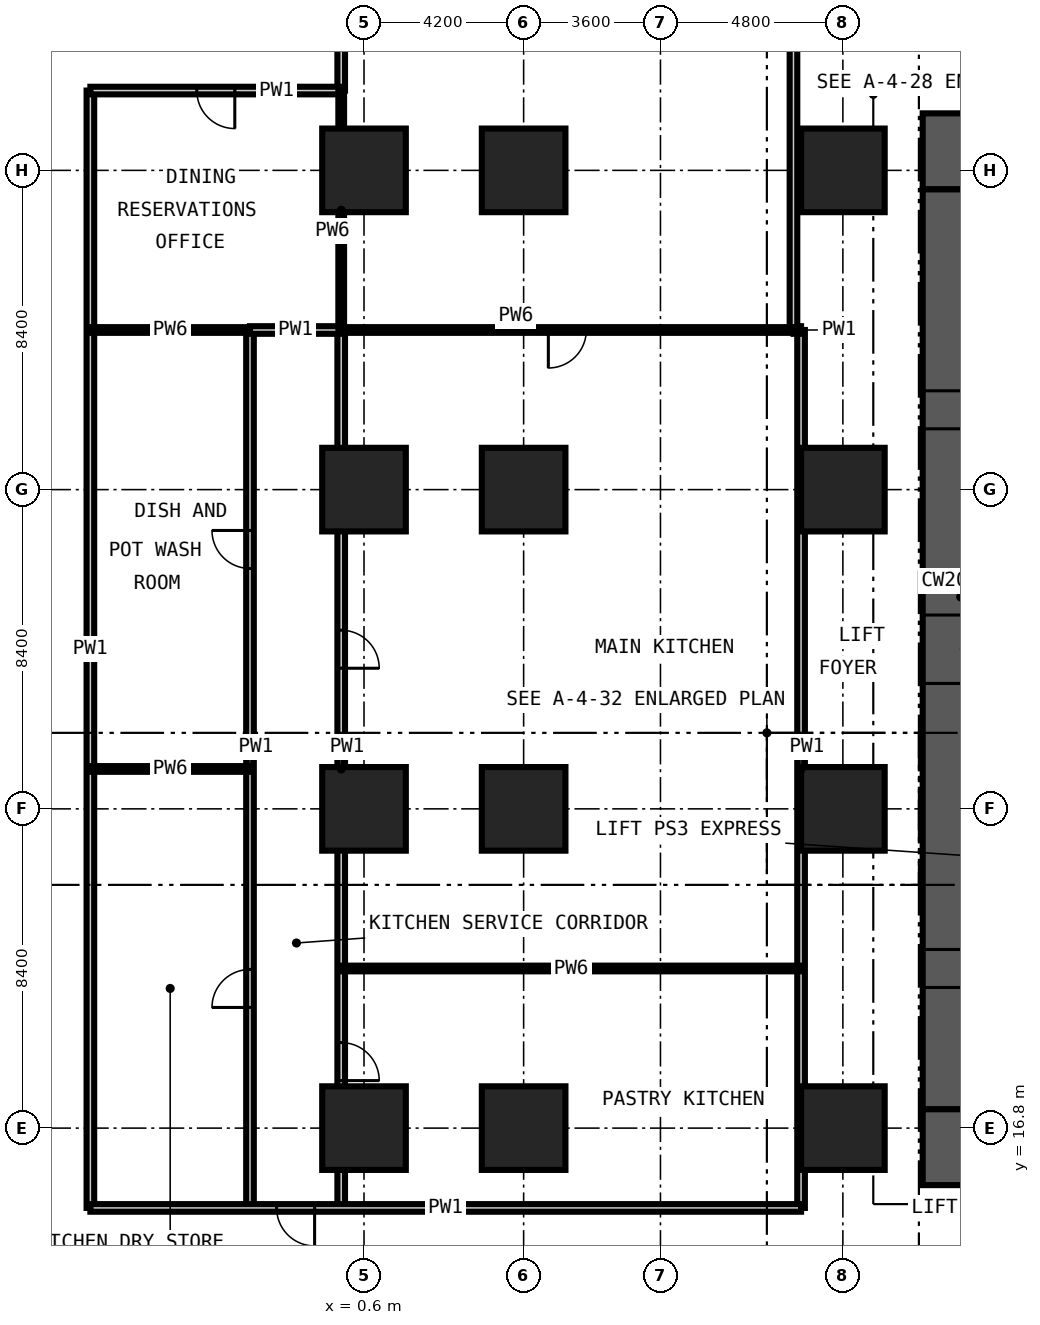
"""IFC4 building model, lengths in metres.
Left out: names, types, materials, properties, quantities, classifications, styles, units other than length and angle.
Written with IfcOpenShell. Run it as: python <this file> out.ifc"""

import sys

from ifc_helpers import new_model, si_unit, direction, frame, frame_2d, origin, origin_2d, place, context, subcontext, project, spatial, rectangle, extrude, element, fill, save


model = new_model("IFC4")
c1 = context("Model", 3, precision=1e-05, world=origin(), true_north=direction((0.0, 1.0)))
c2 = subcontext(c1, "Body", "Model", "MODEL_VIEW")
j1 = project(units=[si_unit("LENGTHUNIT", "METRE"), si_unit("PLANEANGLEUNIT", "RADIAN")], contexts=[c1])
p1 = place(None, origin())
s1 = spatial("IfcSite", under=j1, at=p1, CompositionType="ELEMENT")
p2 = place(p1, origin())
s2 = spatial("IfcBuilding", under=s1, at=p2, CompositionType="ELEMENT")
p3 = place(p2, frame((0.0, 0.0, 17.0)))
s3 = spatial("IfcBuildingStorey", under=s2, at=p3, CompositionType="ELEMENT", Elevation=17.0)
for number, where, z_axis, x_axis in (
    (1, (0.6, 16.8, -0.3), (0.0, 0.0, 1.0), (1.0, 0.0, 0.0)),
    (2, (0.6, 25.2, -0.3), (0.0, 0.0, 1.0), (1.0, 0.0, 0.0)),
    (3, (0.6, 33.6, -0.3), (0.0, 0.0, 1.0), (1.0, 0.0, 0.0)),
    (4, (0.6, 42.0, -0.3), (0.0, 0.0, 1.0), (1.0, 0.0, 0.0)),
    (5, (4.8, 16.8, -0.3), (0.0, 0.0, 1.0), (1.0, 0.0, 0.0)),
    (6, (4.8, 25.2, -0.3), (0.0, 0.0, 1.0), (1.0, 0.0, 0.0)),
    (7, (4.8, 33.6, -0.3), (0.0, 0.0, 1.0), (1.0, 0.0, 0.0)),
    (8, (4.8, 42.0, -0.3), (0.0, 0.0, 1.0), (1.0, 0.0, 0.0)),
    (9, (13.2, 16.8, -0.3), (0.0, 0.0, 1.0), (1.0, 0.0, 0.0)),
    (10, (13.2, 25.2, -0.3), (0.0, 0.0, 1.0), (1.0, 0.0, 0.0)),
    (11, (13.2, 33.6, -0.3), (0.0, 0.0, 1.0), (1.0, 0.0, 0.0)),
    (12, (13.2, 42.0, -0.3), (0.0, 0.0, 1.0), (1.0, 0.0, 0.0)),
):
    element("IfcColumn", number, at=place(p3, frame(where, z_axis=z_axis, x_axis=x_axis)), inside=s3, PredefinedType="COLUMN", context=c2, shape_type="SweptSolid", body=[
        extrude(rectangle(XDim=2.2, YDim=2.2, at=origin_2d()), origin(), (0.0, 0.0, 1.0), 4.95),
    ])
p4 = place(p3, frame((15.3, 16.3, -0.3), z_axis=(0.0, 0.0, 1.0), x_axis=(1.0, 0.0, 0.0)))
e13 = element("IfcWall", 13, at=p4, inside=s3, PredefinedType="SHEAR", context=c2, shape_type="SweptSolid", body=[
    extrude(rectangle(XDim=28.2, YDim=2.0, at=frame_2d((14.1, 0.0))), origin(), (0.0, 0.0, 1.0), 4.95),
])
p5 = place(p4, frame((13.6, 0.0, 0.3)))
e14 = element("IfcOpeningElement", 14, at=p5, cuts=e13, PredefinedType="OPENING", context=c2, shape_type="SweptSolid", body=[
    extrude(rectangle(XDim=1.0, YDim=2.1, at=frame_2d((0.5, 1.05))), frame((0.0, 1.01, 0.0), z_axis=(0.0, -1.0, 0.0), x_axis=(1.0, 0.0, 0.0)), (0.0, 0.0, 1.0), 2.02),
])
p6 = place(p4, frame((19.9, 0.0, 0.3)))
e15 = element("IfcOpeningElement", 15, at=p6, cuts=e13, PredefinedType="OPENING", context=c2, shape_type="SweptSolid", body=[
    extrude(rectangle(XDim=1.0, YDim=2.1, at=frame_2d((0.5, 1.05))), frame((0.0, 1.01, 0.0), z_axis=(0.0, -1.0, 0.0), x_axis=(1.0, 0.0, 0.0)), (0.0, 0.0, 1.0), 2.02),
])
p7 = place(p3, frame((43.5, 42.5, -0.3), z_axis=(0.0, 0.0, 1.0), x_axis=(-1.0, 0.0, 0.0)))
e16 = element("IfcWall", 16, at=p7, inside=s3, PredefinedType="SHEAR", context=c2, shape_type="SweptSolid", body=[
    extrude(rectangle(XDim=28.2, YDim=2.0, at=frame_2d((14.1, 0.0))), origin(), (0.0, 0.0, 1.0), 4.95),
])
p8 = place(p7, frame((22.0, 0.0, 0.3)))
e17 = element("IfcOpeningElement", 17, at=p8, cuts=e16, PredefinedType="OPENING", context=c2, shape_type="SweptSolid", body=[
    extrude(rectangle(XDim=1.0, YDim=2.1, at=frame_2d((0.5, 1.05))), frame((0.0, 1.01, 0.0), z_axis=(0.0, -1.0, 0.0), x_axis=(1.0, 0.0, 0.0)), (0.0, 0.0, 1.0), 2.02),
])
p9 = place(p7, frame((11.4, 0.0, 0.3)))
e18 = element("IfcOpeningElement", 18, at=p9, cuts=e16, PredefinedType="OPENING", context=c2, shape_type="SweptSolid", body=[
    extrude(rectangle(XDim=1.2, YDim=2.2, at=frame_2d((0.6, 1.1))), frame((0.0, 1.01, 0.0), z_axis=(0.0, -1.0, 0.0), x_axis=(1.0, 0.0, 0.0)), (0.0, 0.0, 1.0), 2.02),
])
p10 = place(p3, frame((16.3, 41.5, -0.3), z_axis=(0.0, 0.0, 1.0), x_axis=(0.0, -1.0, 0.0)))
e19 = element("IfcWall", 19, at=p10, inside=s3, PredefinedType="SHEAR", context=c2, shape_type="SweptSolid", body=[
    extrude(rectangle(XDim=24.2, YDim=2.0, at=frame_2d((12.1, 0.0))), origin(), (0.0, 0.0, 1.0), 4.95),
])
p11 = place(p10, frame((11.2, 0.0, 0.3)))
e20 = element("IfcOpeningElement", 20, at=p11, cuts=e19, PredefinedType="OPENING", context=c2, shape_type="SweptSolid", body=[
    extrude(rectangle(XDim=1.8, YDim=2.2, at=frame_2d((0.9, 1.1))), frame((0.0, 1.01, 0.0), z_axis=(0.0, -1.0, 0.0), x_axis=(1.0, 0.0, 0.0)), (0.0, 0.0, 1.0), 2.02),
])
p12 = place(p10, frame((20.0, 0.0, 0.3)))
e21 = element("IfcOpeningElement", 21, at=p12, cuts=e19, PredefinedType="OPENING", context=c2, shape_type="SweptSolid", body=[
    extrude(rectangle(XDim=1.0, YDim=2.1, at=frame_2d((0.5, 1.05))), frame((0.0, 1.01, 0.0), z_axis=(0.0, -1.0, 0.0), x_axis=(1.0, 0.0, 0.0)), (0.0, 0.0, 1.0), 2.02),
])
p13 = place(p10, frame((5.3, 0.0, 0.3)))
e22 = element("IfcOpeningElement", 22, at=p13, cuts=e19, PredefinedType="OPENING", context=c2, shape_type="SweptSolid", body=[
    extrude(rectangle(XDim=1.0, YDim=2.1, at=frame_2d((0.5, 1.05))), frame((0.0, 1.01, 0.0), z_axis=(0.0, -1.0, 0.0), x_axis=(1.0, 0.0, 0.0)), (0.0, 0.0, 1.0), 2.02),
])
p14 = place(p3, frame((-6.6, 14.7, 0.0), z_axis=(0.0, 0.0, 1.0), x_axis=(0.0, 1.0, 0.0)))
e23 = element("IfcWall", 23, at=p14, inside=s3, PredefinedType="PARTITIONING", context=c2, shape_type="SweptSolid", body=[
    extrude(rectangle(XDim=29.4, YDim=0.2, at=frame_2d((14.7, 0.0))), origin(), (0.0, 0.0, 1.0), 4.65),
])
p15 = place(p3, frame((-2.4, 14.7, 0.0), z_axis=(0.0, 0.0, 1.0), x_axis=(0.0, 1.0, 0.0)))
e24 = element("IfcWall", 24, at=p15, inside=s3, PredefinedType="PARTITIONING", context=c2, shape_type="SweptSolid", body=[
    extrude(rectangle(XDim=23.1, YDim=0.2, at=frame_2d((11.55, 0.0))), origin(), (0.0, 0.0, 1.0), 4.65),
])
p16 = place(p15, frame((5.275, 0.0, 0.0)))
e25 = element("IfcOpeningElement", 25, at=p16, cuts=e24, PredefinedType="OPENING", context=c2, shape_type="SweptSolid", body=[
    extrude(rectangle(XDim=1.0, YDim=2.1, at=frame_2d((0.5, 1.05))), frame((0.0, 0.11, 0.0), z_axis=(0.0, -1.0, 0.0), x_axis=(1.0, 0.0, 0.0)), (0.0, 0.0, 1.0), 0.22),
])
p17 = place(p15, frame((16.825, 0.0, 0.0)))
e26 = element("IfcOpeningElement", 26, at=p17, cuts=e24, PredefinedType="OPENING", context=c2, shape_type="SweptSolid", body=[
    extrude(rectangle(XDim=1.0, YDim=2.1, at=frame_2d((0.5, 1.05))), frame((0.0, 0.11, 0.0), z_axis=(0.0, -1.0, 0.0), x_axis=(1.0, 0.0, 0.0)), (0.0, 0.0, 1.0), 0.22),
])
p18 = place(p3, frame((0.0, 14.7, 0.0), z_axis=(0.0, 0.0, 1.0), x_axis=(0.0, 1.0, 0.0)))
e27 = element("IfcWall", 27, at=p18, inside=s3, PredefinedType="PARTITIONING", context=c2, shape_type="SweptSolid", body=[
    extrude(rectangle(XDim=23.1, YDim=0.2, at=frame_2d((11.55, 0.0))), origin(), (0.0, 0.0, 1.0), 4.65),
])
p19 = place(p18, frame((14.2, 0.0, 0.0)))
e28 = element("IfcOpeningElement", 28, at=p19, cuts=e27, PredefinedType="OPENING", context=c2, shape_type="SweptSolid", body=[
    extrude(rectangle(XDim=1.0, YDim=2.1, at=frame_2d((0.5, 1.05))), frame((0.0, 0.11, 0.0), z_axis=(0.0, -1.0, 0.0), x_axis=(1.0, 0.0, 0.0)), (0.0, 0.0, 1.0), 0.22),
])
p20 = place(p18, frame((3.35, 0.0, 0.0)))
e29 = element("IfcOpeningElement", 29, at=p20, cuts=e27, PredefinedType="OPENING", context=c2, shape_type="SweptSolid", body=[
    extrude(rectangle(XDim=1.0, YDim=2.1, at=frame_2d((0.5, 1.05))), frame((0.0, 0.11, 0.0), z_axis=(0.0, -1.0, 0.0), x_axis=(1.0, 0.0, 0.0)), (0.0, 0.0, 1.0), 0.22),
])
p21 = place(p3, frame((0.0, 44.1, 0.0), z_axis=(0.0, 0.0, 1.0), x_axis=(0.0, 1.0, 0.0)))
e30 = element("IfcWall", 30, at=p21, inside=s3, PredefinedType="PARTITIONING", context=c2, shape_type="SweptSolid", body=[
    extrude(rectangle(XDim=14.723, YDim=0.2, at=frame_2d((7.361, 0.0))), origin(), (0.0, 0.0, 1.0), 4.65),
])
p22 = place(p3, frame((12.1, 14.7, 0.0), z_axis=(0.0, 0.0, 1.0), x_axis=(0.0, 1.0, 0.0)))
e31 = element("IfcWall", 31, at=p22, inside=s3, PredefinedType="PARTITIONING", context=c2, shape_type="SweptSolid", body=[
    extrude(rectangle(XDim=23.1, YDim=0.2, at=frame_2d((11.55, 0.0))), origin(), (0.0, 0.0, 1.0), 4.65),
])
p23 = place(p3, frame((-6.6, 14.7, 0.0), z_axis=(0.0, 0.0, 1.0), x_axis=(1.0, 0.0, 0.0)))
e32 = element("IfcWall", 32, at=p23, inside=s3, PredefinedType="PARTITIONING", context=c2, shape_type="SweptSolid", body=[
    extrude(rectangle(XDim=18.7, YDim=0.2, at=frame_2d((9.35, 0.0))), origin(), (0.0, 0.0, 1.0), 4.65),
])
p24 = place(p23, frame((4.9, 0.0, 0.0)))
e33 = element("IfcOpeningElement", 33, at=p24, cuts=e32, PredefinedType="OPENING", context=c2, shape_type="SweptSolid", body=[
    extrude(rectangle(XDim=1.0, YDim=2.1, at=frame_2d((0.5, 1.05))), frame((0.0, 0.11, 0.0), z_axis=(0.0, -1.0, 0.0), x_axis=(1.0, 0.0, 0.0)), (0.0, 0.0, 1.0), 0.22),
])
p25 = place(p3, frame((-2.4, 37.8, 0.0), z_axis=(0.0, 0.0, 1.0), x_axis=(1.0, 0.0, 0.0)))
e34 = element("IfcWall", 34, at=p25, inside=s3, PredefinedType="PARTITIONING", context=c2, shape_type="SweptSolid", body=[
    extrude(rectangle(XDim=2.4, YDim=0.2, at=frame_2d((1.2, 0.0))), origin(), (0.0, 0.0, 1.0), 4.65),
])
p26 = place(p3, frame((11.9, 37.8, 0.0), z_axis=(0.0, 0.0, 1.0), x_axis=(1.0, 0.0, 0.0)))
e35 = element("IfcWall", 35, at=p26, inside=s3, PredefinedType="PARTITIONING", context=c2, shape_type="SweptSolid", body=[
    extrude(rectangle(XDim=0.2, YDim=0.2, at=frame_2d((0.1, 0.0))), origin(), (0.0, 0.0, 1.0), 4.65),
])
p27 = place(p3, frame((-6.6, 44.1, 0.0), z_axis=(0.0, 0.0, 1.0), x_axis=(1.0, 0.0, 0.0)))
e36 = element("IfcWall", 36, at=p27, inside=s3, PredefinedType="PARTITIONING", context=c2, shape_type="SweptSolid", body=[
    extrude(rectangle(XDim=6.6, YDim=0.2, at=frame_2d((3.3, 0.0))), origin(), (0.0, 0.0, 1.0), 4.65),
])
p28 = place(p27, frame((2.8, 0.0, 0.0)))
e37 = element("IfcOpeningElement", 37, at=p28, cuts=e36, PredefinedType="OPENING", context=c2, shape_type="SweptSolid", body=[
    extrude(rectangle(XDim=1.0, YDim=2.1, at=frame_2d((0.5, 1.05))), frame((0.0, 0.11, 0.0), z_axis=(0.0, -1.0, 0.0), x_axis=(1.0, 0.0, 0.0)), (0.0, 0.0, 1.0), 0.22),
])
p29 = place(p3, frame((11.9, 58.823, 0.0), z_axis=(0.0, 0.0, 1.0), x_axis=(0.0, -1.0, 0.0)))
e38 = element("IfcWall", 38, at=p29, inside=s3, PredefinedType="PARTITIONING", context=c2, shape_type="SweptSolid", body=[
    extrude(rectangle(XDim=21.023, YDim=0.2, at=frame_2d((10.511, 0.0))), origin(), (0.0, 0.0, 1.0), 4.65),
])
p30 = place(p29, frame((9.623, 0.0, 0.0)))
e39 = element("IfcOpeningElement", 39, at=p30, cuts=e38, PredefinedType="OPENING", context=c2, shape_type="SweptSolid", body=[
    extrude(rectangle(XDim=1.8, YDim=2.4, at=frame_2d((0.9, 1.2))), frame((0.0, 0.11, 0.0), z_axis=(0.0, -1.0, 0.0), x_axis=(1.0, 0.0, 0.0)), (0.0, 0.0, 1.0), 0.22),
])
p31 = place(p3, frame((0.0, 37.8, 0.0), z_axis=(0.0, 0.0, 1.0), x_axis=(0.0, 1.0, 0.0)))
e40 = element("IfcWall", 40, at=p31, inside=s3, PredefinedType="PARTITIONING", context=c2, shape_type="SweptSolid", body=[
    extrude(rectangle(XDim=6.3, YDim=0.15, at=frame_2d((3.15, 0.0))), origin(), (0.0, 0.0, 1.0), 4.65),
])
p32 = place(p3, frame((0.0, 21.0, 0.0), z_axis=(0.0, 0.0, 1.0), x_axis=(1.0, 0.0, 0.0)))
e41 = element("IfcWall", 41, at=p32, inside=s3, PredefinedType="PARTITIONING", context=c2, shape_type="SweptSolid", body=[
    extrude(rectangle(XDim=12.1, YDim=0.15, at=frame_2d((6.05, 0.0))), origin(), (0.0, 0.0, 1.0), 4.65),
])
for number, where, z_axis, x_axis in (
    (42, (-6.6, 26.25, 0.0), (0.0, 0.0, 1.0), (1.0, 0.0, 0.0)),
    (43, (-6.6, 37.8, 0.0), (0.0, 0.0, 1.0), (1.0, 0.0, 0.0)),
):
    element("IfcWall", number, at=place(p3, frame(where, z_axis=z_axis, x_axis=x_axis)), inside=s3, PredefinedType="PARTITIONING", context=c2, shape_type="SweptSolid", body=[
        extrude(rectangle(XDim=4.2, YDim=0.15, at=frame_2d((2.1, 0.0))), origin(), (0.0, 0.0, 1.0), 4.65),
    ])
p33 = place(p3, frame((0.0, 37.8, 0.0), z_axis=(0.0, 0.0, 1.0), x_axis=(1.0, 0.0, 0.0)))
e44 = element("IfcWall", 44, at=p33, inside=s3, PredefinedType="PARTITIONING", context=c2, shape_type="SweptSolid", body=[
    extrude(rectangle(XDim=11.9, YDim=0.15, at=frame_2d((5.95, 0.0))), origin(), (0.0, 0.0, 1.0), 4.65),
])
p34 = place(p33, frame((5.45, 0.0, 0.0)))
e45 = element("IfcOpeningElement", 45, at=p34, cuts=e44, PredefinedType="OPENING", context=c2, shape_type="SweptSolid", body=[
    extrude(rectangle(XDim=1.0, YDim=2.1, at=frame_2d((0.5, 1.05))), frame((0.0, 0.085, 0.0), z_axis=(0.0, -1.0, 0.0), x_axis=(1.0, 0.0, 0.0)), (0.0, 0.0, 1.0), 0.17),
])
p35 = place(p11, origin())
e46 = element("IfcDoor", 46, at=p35, inside=s3, OperationType="DOUBLE_DOOR_DOUBLE_SWING", PredefinedType="DOOR", context=c2, shape_type="SweptSolid", body=[
    extrude(rectangle(XDim=1.8, YDim=2.2, at=frame_2d((0.9, 1.1))), frame((0.0, 0.025, 0.0), z_axis=(0.0, -1.0, 0.0), x_axis=(1.0, 0.0, 0.0)), (0.0, 0.0, 1.0), 0.05),
])
fill(e20, e46)
p36 = place(p12, origin())
e47 = element("IfcDoor", 47, at=p36, inside=s3, OperationType="SINGLE_SWING_LEFT", PredefinedType="DOOR", context=c2, shape_type="SweptSolid", body=[
    extrude(rectangle(XDim=1.0, YDim=2.1, at=frame_2d((0.5, 1.05))), frame((0.0, 0.025, 0.0), z_axis=(0.0, -1.0, 0.0), x_axis=(1.0, 0.0, 0.0)), (0.0, 0.0, 1.0), 0.05),
])
fill(e21, e47)
p37 = place(p13, origin())
e48 = element("IfcDoor", 48, at=p37, inside=s3, OperationType="SINGLE_SWING_RIGHT", PredefinedType="DOOR", context=c2, shape_type="SweptSolid", body=[
    extrude(rectangle(XDim=1.0, YDim=2.1, at=frame_2d((0.5, 1.05))), frame((0.0, 0.025, 0.0), z_axis=(0.0, -1.0, 0.0), x_axis=(1.0, 0.0, 0.0)), (0.0, 0.0, 1.0), 0.05),
])
fill(e22, e48)
p38 = place(p34, frame((1.0, 0.0, 0.0), z_axis=(0.0, 0.0, 1.0), x_axis=(-1.0, 0.0, 0.0)))
e49 = element("IfcDoor", 49, at=p38, inside=s3, OperationType="SINGLE_SWING_RIGHT", PredefinedType="DOOR", context=c2, shape_type="SweptSolid", body=[
    extrude(rectangle(XDim=1.0, YDim=2.1, at=frame_2d((0.5, 1.05))), frame((0.0, 0.025, 0.0), z_axis=(0.0, -1.0, 0.0), x_axis=(1.0, 0.0, 0.0)), (0.0, 0.0, 1.0), 0.05),
])
fill(e45, e49)
p39 = place(p19, frame((1.0, 0.0, 0.0), z_axis=(0.0, 0.0, 1.0), x_axis=(-1.0, 0.0, 0.0)))
e50 = element("IfcDoor", 50, at=p39, inside=s3, OperationType="SINGLE_SWING_RIGHT", PredefinedType="DOOR", context=c2, shape_type="SweptSolid", body=[
    extrude(rectangle(XDim=1.0, YDim=2.1, at=frame_2d((0.5, 1.05))), frame((0.0, 0.025, 0.0), z_axis=(0.0, -1.0, 0.0), x_axis=(1.0, 0.0, 0.0)), (0.0, 0.0, 1.0), 0.05),
])
fill(e28, e50)
p40 = place(p20, frame((1.0, 0.0, 0.0), z_axis=(0.0, 0.0, 1.0), x_axis=(-1.0, 0.0, 0.0)))
e51 = element("IfcDoor", 51, at=p40, inside=s3, OperationType="SINGLE_SWING_RIGHT", PredefinedType="DOOR", context=c2, shape_type="SweptSolid", body=[
    extrude(rectangle(XDim=1.0, YDim=2.1, at=frame_2d((0.5, 1.05))), frame((0.0, 0.025, 0.0), z_axis=(0.0, -1.0, 0.0), x_axis=(1.0, 0.0, 0.0)), (0.0, 0.0, 1.0), 0.05),
])
fill(e29, e51)
p41 = place(p24, frame((1.0, 0.0, 0.0), z_axis=(0.0, 0.0, 1.0), x_axis=(-1.0, 0.0, 0.0)))
e52 = element("IfcDoor", 52, at=p41, inside=s3, OperationType="SINGLE_SWING_LEFT", PredefinedType="DOOR", context=c2, shape_type="SweptSolid", body=[
    extrude(rectangle(XDim=1.0, YDim=2.1, at=frame_2d((0.5, 1.05))), frame((0.0, 0.025, 0.0), z_axis=(0.0, -1.0, 0.0), x_axis=(1.0, 0.0, 0.0)), (0.0, 0.0, 1.0), 0.05),
])
fill(e33, e52)
p42 = place(p16, origin())
e53 = element("IfcDoor", 53, at=p42, inside=s3, OperationType="SINGLE_SWING_LEFT", PredefinedType="DOOR", context=c2, shape_type="SweptSolid", body=[
    extrude(rectangle(XDim=1.0, YDim=2.1, at=frame_2d((0.5, 1.05))), frame((0.0, 0.025, 0.0), z_axis=(0.0, -1.0, 0.0), x_axis=(1.0, 0.0, 0.0)), (0.0, 0.0, 1.0), 0.05),
])
fill(e25, e53)
p43 = place(p17, origin())
e54 = element("IfcDoor", 54, at=p43, inside=s3, OperationType="SINGLE_SWING_RIGHT", PredefinedType="DOOR", context=c2, shape_type="SweptSolid", body=[
    extrude(rectangle(XDim=1.0, YDim=2.1, at=frame_2d((0.5, 1.05))), frame((0.0, 0.025, 0.0), z_axis=(0.0, -1.0, 0.0), x_axis=(1.0, 0.0, 0.0)), (0.0, 0.0, 1.0), 0.05),
])
fill(e26, e54)
p44 = place(p28, frame((1.0, 0.0, 0.0), z_axis=(0.0, 0.0, 1.0), x_axis=(-1.0, 0.0, 0.0)))
e55 = element("IfcDoor", 55, at=p44, inside=s3, OperationType="SINGLE_SWING_LEFT", PredefinedType="DOOR", context=c2, shape_type="SweptSolid", body=[
    extrude(rectangle(XDim=1.0, YDim=2.1, at=frame_2d((0.5, 1.05))), frame((0.0, 0.025, 0.0), z_axis=(0.0, -1.0, 0.0), x_axis=(1.0, 0.0, 0.0)), (0.0, 0.0, 1.0), 0.05),
])
fill(e37, e55)
save(model, sys.argv[1])
